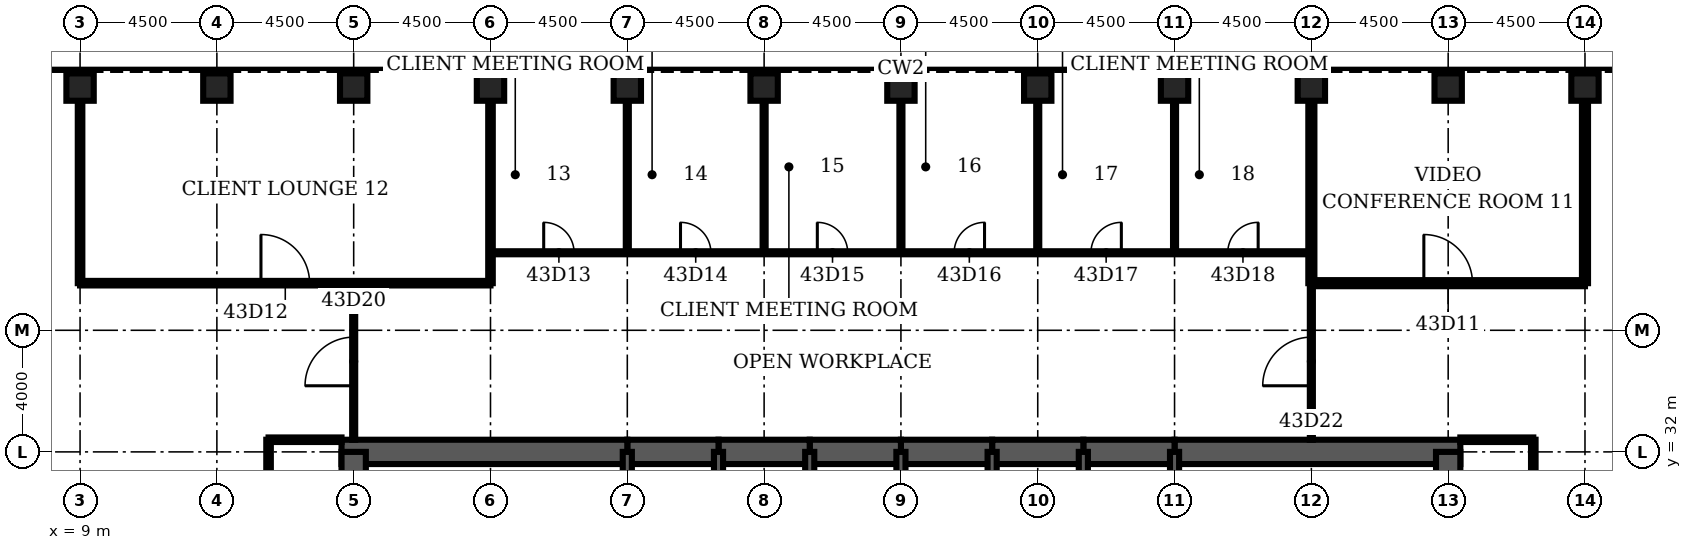
"""IFC4 building model, lengths in metres.
Left out: names, types, materials, properties, quantities, classifications, styles, units other than length and angle.
Written with IfcOpenShell. Run it as: python <this file> out.ifc"""

import sys

from ifc_helpers import new_model, si_unit, direction, frame, frame_2d, origin, origin_2d, place, context, subcontext, project, spatial, rectangle, hollow_rectangle, extrude, element, fill, save


model = new_model("IFC4")
c1 = context("Model", 3, precision=1e-05, world=origin(), true_north=direction((0.0, 1.0)))
c2 = subcontext(c1, "Body", "Model", "MODEL_VIEW")
j1 = project(units=[si_unit("LENGTHUNIT", "METRE"), si_unit("PLANEANGLEUNIT", "RADIAN")], contexts=[c1])
p1 = place(None, origin())
s1 = spatial("IfcSite", under=j1, at=p1, CompositionType="ELEMENT")
p2 = place(p1, origin())
s2 = spatial("IfcBuilding", under=s1, at=p2, CompositionType="ELEMENT")
p3 = place(p2, frame((0.0, 0.0, 194.2)))
s3 = spatial("IfcBuildingStorey", under=s2, at=p3, CompositionType="ELEMENT", Elevation=194.2)
for number, where, z_axis, x_axis in (
    (1, (58.5, 44.0, 0.0), (0.0, 0.0, 1.0), (0.0, 1.0, 0.0)),
    (2, (54.0, 44.0, 0.0), (0.0, 0.0, 1.0), (0.0, 1.0, 0.0)),
    (3, (49.5, 44.0, 0.0), (0.0, 0.0, 1.0), (0.0, 1.0, 0.0)),
    (4, (45.0, 44.0, 0.0), (0.0, 0.0, 1.0), (0.0, 1.0, 0.0)),
    (5, (40.5, 44.0, 0.0), (0.0, 0.0, 1.0), (0.0, 1.0, 0.0)),
    (6, (36.0, 44.0, 0.0), (0.0, 0.0, 1.0), (0.0, 1.0, 0.0)),
    (7, (31.5, 44.0, 0.0), (0.0, 0.0, 1.0), (0.0, 1.0, 0.0)),
    (8, (27.0, 44.0, 0.0), (0.0, 0.0, 1.0), (0.0, 1.0, 0.0)),
    (9, (22.5, 44.0, 0.0), (0.0, 0.0, 1.0), (0.0, 1.0, 0.0)),
    (10, (18.0, 44.0, 0.0), (0.0, 0.0, 1.0), (0.0, 1.0, 0.0)),
    (11, (13.5, 44.0, 0.0), (0.0, 0.0, 1.0), (0.0, 1.0, 0.0)),
    (12, (9.0, 44.0, 0.0), (0.0, 0.0, 1.0), (0.0, 1.0, 0.0)),
):
    element("IfcColumn", number, at=place(p3, frame(where, z_axis=z_axis, x_axis=x_axis)), inside=s3, PredefinedType="COLUMN", context=c2, shape_type="SweptSolid", body=[
        extrude(hollow_rectangle(XDim=0.9, YDim=0.9, WallThickness=0.09, at=origin_2d()), origin(), (0.0, 0.0, 1.0), 4.2),
    ])
p4 = place(p3, frame((54.4, 32.0, 0.0), z_axis=(0.0, 0.0, 1.0), x_axis=(-1.0, 0.0, 0.0)))
e13 = element("IfcWall", 13, at=p4, inside=s3, PredefinedType="SHEAR", context=c2, shape_type="SweptSolid", body=[
    extrude(rectangle(XDim=9.4, YDim=0.8, at=frame_2d((4.7, 0.0))), origin(), (0.0, 0.0, 1.0), 4.2),
])
for number, where, z_axis, x_axis in (
    (14, (45.0, 32.0, 0.0), (0.0, 0.0, 1.0), (-1.0, 0.0, 0.0)),
    (15, (42.0, 32.0, 0.0), (0.0, 0.0, 1.0), (-1.0, 0.0, 0.0)),
    (16, (39.0, 32.0, 0.0), (0.0, 0.0, 1.0), (-1.0, 0.0, 0.0)),
    (17, (36.0, 32.0, 0.0), (0.0, 0.0, 1.0), (-1.0, 0.0, 0.0)),
    (18, (33.0, 32.0, 0.0), (0.0, 0.0, 1.0), (-1.0, 0.0, 0.0)),
    (19, (30.0, 32.0, 0.0), (0.0, 0.0, 1.0), (-1.0, 0.0, 0.0)),
):
    element("IfcWall", number, at=place(p3, frame(where, z_axis=z_axis, x_axis=x_axis)), inside=s3, PredefinedType="SHEAR", context=c2, shape_type="SweptSolid", body=[
        extrude(rectangle(XDim=3.0, YDim=0.8, at=frame_2d((1.5, 0.0))), origin(), (0.0, 0.0, 1.0), 4.2),
    ])
p5 = place(p3, frame((27.0, 32.0, 0.0), z_axis=(0.0, 0.0, 1.0), x_axis=(-1.0, 0.0, 0.0)))
e20 = element("IfcWall", 20, at=p5, inside=s3, PredefinedType="SHEAR", context=c2, shape_type="SweptSolid", body=[
    extrude(rectangle(XDim=9.4, YDim=0.8, at=frame_2d((4.7, 0.0))), origin(), (0.0, 0.0, 1.0), 4.2),
])
for number, where, z_axis, x_axis in (
    (21, (18.0, 32.0, 0.0), (0.0, 0.0, 1.0), (0.0, -1.0, 0.0)),
    (22, (54.0, 28.8, 0.0), (0.0, 0.0, 1.0), (0.0, 1.0, 0.0)),
):
    element("IfcWall", number, at=place(p3, frame(where, z_axis=z_axis, x_axis=x_axis)), inside=s3, PredefinedType="SHEAR", context=c2, shape_type="SweptSolid", body=[
        extrude(rectangle(XDim=3.2, YDim=0.8, at=frame_2d((1.6, 0.0))), origin(), (0.0, 0.0, 1.0), 4.2),
    ])
for number, where, z_axis, x_axis in (
    (23, (27.0, 28.8, 0.0), (0.0, 0.0, 1.0), (0.0, 1.0, 0.0)),
    (24, (30.0, 28.8, 0.0), (0.0, 0.0, 1.0), (0.0, 1.0, 0.0)),
    (25, (33.0, 28.8, 0.0), (0.0, 0.0, 1.0), (0.0, 1.0, 0.0)),
    (26, (36.0, 28.8, 0.0), (0.0, 0.0, 1.0), (0.0, 1.0, 0.0)),
    (27, (39.0, 28.8, 0.0), (0.0, 0.0, 1.0), (0.0, 1.0, 0.0)),
    (28, (42.0, 28.8, 0.0), (0.0, 0.0, 1.0), (0.0, 1.0, 0.0)),
    (29, (45.0, 28.8, 0.0), (0.0, 0.0, 1.0), (0.0, 1.0, 0.0)),
):
    element("IfcWall", number, at=place(p3, frame(where, z_axis=z_axis, x_axis=x_axis)), inside=s3, PredefinedType="SOLIDWALL", context=c2, shape_type="SweptSolid", body=[
        extrude(rectangle(XDim=3.2, YDim=0.3, at=frame_2d((1.6, 0.0))), origin(), (0.0, 0.0, 1.0), 4.2),
    ])
for number, where, z_axis, x_axis in (
    (30, (15.2, 32.4, 0.0), (0.0, 0.0, 1.0), (1.0, 0.0, 0.0)),
    (31, (54.4, 32.4, 0.0), (0.0, 0.0, 1.0), (1.0, 0.0, 0.0)),
):
    element("IfcWall", number, at=place(p3, frame(where, z_axis=z_axis, x_axis=x_axis)), inside=s3, PredefinedType="PARTITIONING", context=c2, shape_type="SweptSolid", body=[
        extrude(rectangle(XDim=2.4, YDim=0.15, at=frame_2d((1.2, 0.0))), origin(), (0.0, 0.0, 1.0), 3.0),
    ])
p6 = place(p3, frame((9.0, 37.55, 0.0), z_axis=(0.0, 0.0, 1.0), x_axis=(1.0, 0.0, 0.0)))
e32 = element("IfcWall", 32, at=p6, inside=s3, PredefinedType="PARTITIONING", context=c2, shape_type="SweptSolid", body=[
    extrude(rectangle(XDim=13.5, YDim=0.15, at=frame_2d((6.75, 0.0))), origin(), (0.0, 0.0, 1.0), 3.0),
])
p7 = place(p6, frame((5.95, 0.0, 0.0)))
e33 = element("IfcOpeningElement", 33, at=p7, cuts=e32, PredefinedType="OPENING", context=c2, shape_type="SweptSolid", body=[
    extrude(rectangle(XDim=1.6, YDim=2.1, at=frame_2d((0.8, 1.05))), frame((0.0, 0.085, 0.0), z_axis=(0.0, -1.0, 0.0), x_axis=(1.0, 0.0, 0.0)), (0.0, 0.0, 1.0), 0.17),
])
p8 = place(p3, frame((49.5, 37.55, 0.0), z_axis=(0.0, 0.0, 1.0), x_axis=(1.0, 0.0, 0.0)))
e34 = element("IfcWall", 34, at=p8, inside=s3, PredefinedType="PARTITIONING", context=c2, shape_type="SweptSolid", body=[
    extrude(rectangle(XDim=9.0, YDim=0.2, at=frame_2d((4.5, 0.0))), origin(), (0.0, 0.0, 1.0), 3.0),
])
p9 = place(p8, frame((3.7, 0.0, 0.0)))
e35 = element("IfcOpeningElement", 35, at=p9, cuts=e34, PredefinedType="OPENING", context=c2, shape_type="SweptSolid", body=[
    extrude(rectangle(XDim=1.6, YDim=2.1, at=frame_2d((0.8, 1.05))), frame((0.0, 0.11, 0.0), z_axis=(0.0, -1.0, 0.0), x_axis=(1.0, 0.0, 0.0)), (0.0, 0.0, 1.0), 0.22),
])
p10 = place(p3, frame((22.5, 38.55, 0.0), z_axis=(0.0, 0.0, 1.0), x_axis=(1.0, 0.0, 0.0)))
e36 = element("IfcWall", 36, at=p10, inside=s3, PredefinedType="PARTITIONING", context=c2, shape_type="SweptSolid", body=[
    extrude(rectangle(XDim=27.0, YDim=0.1, at=frame_2d((13.5, 0.0))), origin(), (0.0, 0.0, 1.0), 3.0),
])
p11 = place(p10, frame((1.75, 0.0, 0.0)))
e37 = element("IfcOpeningElement", 37, at=p11, cuts=e36, PredefinedType="OPENING", context=c2, shape_type="SweptSolid", body=[
    extrude(rectangle(XDim=1.0, YDim=2.1, at=frame_2d((0.5, 1.05))), frame((0.0, 0.06, 0.0), z_axis=(0.0, -1.0, 0.0), x_axis=(1.0, 0.0, 0.0)), (0.0, 0.0, 1.0), 0.12),
])
p12 = place(p10, frame((6.25, 0.0, 0.0)))
e38 = element("IfcOpeningElement", 38, at=p12, cuts=e36, PredefinedType="OPENING", context=c2, shape_type="SweptSolid", body=[
    extrude(rectangle(XDim=1.0, YDim=2.1, at=frame_2d((0.5, 1.05))), frame((0.0, 0.06, 0.0), z_axis=(0.0, -1.0, 0.0), x_axis=(1.0, 0.0, 0.0)), (0.0, 0.0, 1.0), 0.12),
])
p13 = place(p10, frame((10.75, 0.0, 0.0)))
e39 = element("IfcOpeningElement", 39, at=p13, cuts=e36, PredefinedType="OPENING", context=c2, shape_type="SweptSolid", body=[
    extrude(rectangle(XDim=1.0, YDim=2.1, at=frame_2d((0.5, 1.05))), frame((0.0, 0.06, 0.0), z_axis=(0.0, -1.0, 0.0), x_axis=(1.0, 0.0, 0.0)), (0.0, 0.0, 1.0), 0.12),
])
p14 = place(p10, frame((15.25, 0.0, 0.0)))
e40 = element("IfcOpeningElement", 40, at=p14, cuts=e36, PredefinedType="OPENING", context=c2, shape_type="SweptSolid", body=[
    extrude(rectangle(XDim=1.0, YDim=2.1, at=frame_2d((0.5, 1.05))), frame((0.0, 0.06, 0.0), z_axis=(0.0, -1.0, 0.0), x_axis=(1.0, 0.0, 0.0)), (0.0, 0.0, 1.0), 0.12),
])
p15 = place(p10, frame((19.75, 0.0, 0.0)))
e41 = element("IfcOpeningElement", 41, at=p15, cuts=e36, PredefinedType="OPENING", context=c2, shape_type="SweptSolid", body=[
    extrude(rectangle(XDim=1.0, YDim=2.1, at=frame_2d((0.5, 1.05))), frame((0.0, 0.06, 0.0), z_axis=(0.0, -1.0, 0.0), x_axis=(1.0, 0.0, 0.0)), (0.0, 0.0, 1.0), 0.12),
])
p16 = place(p10, frame((24.25, 0.0, 0.0)))
e42 = element("IfcOpeningElement", 42, at=p16, cuts=e36, PredefinedType="OPENING", context=c2, shape_type="SweptSolid", body=[
    extrude(rectangle(XDim=1.0, YDim=2.1, at=frame_2d((0.5, 1.05))), frame((0.0, 0.06, 0.0), z_axis=(0.0, -1.0, 0.0), x_axis=(1.0, 0.0, 0.0)), (0.0, 0.0, 1.0), 0.12),
])
p17 = place(p3, frame((9.0, 37.55, 0.0), z_axis=(0.0, 0.0, 1.0), x_axis=(0.0, 1.0, 0.0)))
e43 = element("IfcWall", 43, at=p17, inside=s3, PredefinedType="PARTITIONING", context=c2, shape_type="SweptSolid", body=[
    extrude(rectangle(XDim=6.0, YDim=0.15, at=frame_2d((3.0, 0.0))), origin(), (0.0, 0.0, 1.0), 3.0),
])
p18 = place(p3, frame((15.2, 13.8, 0.0), z_axis=(0.0, 0.0, 1.0), x_axis=(0.0, 1.0, 0.0)))
e44 = element("IfcWall", 44, at=p18, inside=s3, PredefinedType="PARTITIONING", context=c2, shape_type="SweptSolid", body=[
    extrude(rectangle(XDim=18.6, YDim=0.15, at=frame_2d((9.3, 0.0))), origin(), (0.0, 0.0, 1.0), 3.0),
])
p19 = place(p18, frame((8.7, 0.0, 0.0)))
e45 = element("IfcOpeningElement", 45, at=p19, cuts=e44, PredefinedType="OPENING", context=c2, shape_type="SweptSolid", body=[
    extrude(rectangle(XDim=1.2, YDim=2.1, at=frame_2d((0.6, 1.05))), frame((0.0, 0.085, 0.0), z_axis=(0.0, -1.0, 0.0), x_axis=(1.0, 0.0, 0.0)), (0.0, 0.0, 1.0), 0.17),
])
p20 = place(p3, frame((18.0, 32.4, 0.0), z_axis=(0.0, 0.0, 1.0), x_axis=(0.0, 1.0, 0.0)))
e46 = element("IfcWall", 46, at=p20, inside=s3, PredefinedType="PARTITIONING", context=c2, shape_type="SweptSolid", body=[
    extrude(rectangle(XDim=5.15, YDim=0.1, at=frame_2d((2.575, 0.0))), origin(), (0.0, 0.0, 1.0), 3.0),
])
p21 = place(p20, frame((1.775, 0.0, 0.0)))
e47 = element("IfcOpeningElement", 47, at=p21, cuts=e46, PredefinedType="OPENING", context=c2, shape_type="SweptSolid", body=[
    extrude(rectangle(XDim=1.6, YDim=2.1, at=frame_2d((0.8, 1.05))), frame((0.0, 0.06, 0.0), z_axis=(0.0, -1.0, 0.0), x_axis=(1.0, 0.0, 0.0)), (0.0, 0.0, 1.0), 0.12),
])
p22 = place(p3, frame((22.5, 37.55, 0.0), z_axis=(0.0, 0.0, 1.0), x_axis=(0.0, 1.0, 0.0)))
e48 = element("IfcWall", 48, at=p22, inside=s3, PredefinedType="PARTITIONING", context=c2, shape_type="SweptSolid", body=[
    extrude(rectangle(XDim=6.0, YDim=0.15, at=frame_2d((3.0, 0.0))), origin(), (0.0, 0.0, 1.0), 3.0),
])
for number, where, z_axis, x_axis in (
    (49, (27.0, 38.55, 0.0), (0.0, 0.0, 1.0), (0.0, 1.0, 0.0)),
    (50, (31.5, 38.55, 0.0), (0.0, 0.0, 1.0), (0.0, 1.0, 0.0)),
    (51, (36.0, 38.55, 0.0), (0.0, 0.0, 1.0), (0.0, 1.0, 0.0)),
    (52, (40.5, 38.55, 0.0), (0.0, 0.0, 1.0), (0.0, 1.0, 0.0)),
    (53, (45.0, 38.55, 0.0), (0.0, 0.0, 1.0), (0.0, 1.0, 0.0)),
):
    element("IfcWall", number, at=place(p3, frame(where, z_axis=z_axis, x_axis=x_axis)), inside=s3, PredefinedType="PARTITIONING", context=c2, shape_type="SweptSolid", body=[
        extrude(rectangle(XDim=5.0, YDim=0.1, at=frame_2d((2.5, 0.0))), origin(), (0.0, 0.0, 1.0), 3.0),
    ])
p23 = place(p3, frame((49.5, 32.4, 0.0), z_axis=(0.0, 0.0, 1.0), x_axis=(0.0, 1.0, 0.0)))
e54 = element("IfcWall", 54, at=p23, inside=s3, PredefinedType="PARTITIONING", context=c2, shape_type="SweptSolid", body=[
    extrude(rectangle(XDim=5.15, YDim=0.1, at=frame_2d((2.575, 0.0))), origin(), (0.0, 0.0, 1.0), 3.0),
])
p24 = place(p23, frame((1.775, 0.0, 0.0)))
e55 = element("IfcOpeningElement", 55, at=p24, cuts=e54, PredefinedType="OPENING", context=c2, shape_type="SweptSolid", body=[
    extrude(rectangle(XDim=1.6, YDim=2.1, at=frame_2d((0.8, 1.05))), frame((0.0, 0.06, 0.0), z_axis=(0.0, -1.0, 0.0), x_axis=(1.0, 0.0, 0.0)), (0.0, 0.0, 1.0), 0.12),
])
p25 = place(p3, frame((49.5, 37.55, 0.0), z_axis=(0.0, 0.0, 1.0), x_axis=(0.0, 1.0, 0.0)))
e56 = element("IfcWall", 56, at=p25, inside=s3, PredefinedType="PARTITIONING", context=c2, shape_type="SweptSolid", body=[
    extrude(rectangle(XDim=6.0, YDim=0.2, at=frame_2d((3.0, 0.0))), origin(), (0.0, 0.0, 1.0), 3.0),
])
p26 = place(p3, frame((56.8, 13.8, 0.0), z_axis=(0.0, 0.0, 1.0), x_axis=(0.0, 1.0, 0.0)))
e57 = element("IfcWall", 57, at=p26, inside=s3, PredefinedType="PARTITIONING", context=c2, shape_type="SweptSolid", body=[
    extrude(rectangle(XDim=18.6, YDim=0.15, at=frame_2d((9.3, 0.0))), origin(), (0.0, 0.0, 1.0), 3.0),
])
p27 = place(p26, frame((8.7, 0.0, 0.0)))
e58 = element("IfcOpeningElement", 58, at=p27, cuts=e57, PredefinedType="OPENING", context=c2, shape_type="SweptSolid", body=[
    extrude(rectangle(XDim=1.2, YDim=2.1, at=frame_2d((0.6, 1.05))), frame((0.0, 0.085, 0.0), z_axis=(0.0, -1.0, 0.0), x_axis=(1.0, 0.0, 0.0)), (0.0, 0.0, 1.0), 0.17),
])
p28 = place(p3, frame((58.5, 37.55, 0.0), z_axis=(0.0, 0.0, 1.0), x_axis=(0.0, 1.0, 0.0)))
e59 = element("IfcWall", 59, at=p28, inside=s3, PredefinedType="PARTITIONING", context=c2, shape_type="SweptSolid", body=[
    extrude(rectangle(XDim=6.0, YDim=0.2, at=frame_2d((3.0, 0.0))), origin(), (0.0, 0.0, 1.0), 3.0),
])
p29 = place(p9, origin())
e60 = element("IfcDoor", 60, at=p29, inside=s3, OperationType="SINGLE_SWING_LEFT", PredefinedType="DOOR", context=c2, shape_type="SweptSolid", body=[
    extrude(rectangle(XDim=1.6, YDim=2.1, at=frame_2d((0.8, 1.05))), frame((0.0, 0.025, 0.0), z_axis=(0.0, -1.0, 0.0), x_axis=(1.0, 0.0, 0.0)), (0.0, 0.0, 1.0), 0.05),
])
fill(e35, e60)
p30 = place(p7, origin())
e61 = element("IfcDoor", 61, at=p30, inside=s3, OperationType="SINGLE_SWING_LEFT", PredefinedType="DOOR", context=c2, shape_type="SweptSolid", body=[
    extrude(rectangle(XDim=1.6, YDim=2.1, at=frame_2d((0.8, 1.05))), frame((0.0, 0.025, 0.0), z_axis=(0.0, -1.0, 0.0), x_axis=(1.0, 0.0, 0.0)), (0.0, 0.0, 1.0), 0.05),
])
fill(e33, e61)
p31 = place(p11, origin())
e62 = element("IfcDoor", 62, at=p31, inside=s3, OperationType="SINGLE_SWING_LEFT", PredefinedType="DOOR", context=c2, shape_type="SweptSolid", body=[
    extrude(rectangle(XDim=1.0, YDim=2.1, at=frame_2d((0.5, 1.05))), frame((0.0, 0.025, 0.0), z_axis=(0.0, -1.0, 0.0), x_axis=(1.0, 0.0, 0.0)), (0.0, 0.0, 1.0), 0.05),
])
fill(e37, e62)
p32 = place(p12, origin())
e63 = element("IfcDoor", 63, at=p32, inside=s3, OperationType="SINGLE_SWING_LEFT", PredefinedType="DOOR", context=c2, shape_type="SweptSolid", body=[
    extrude(rectangle(XDim=1.0, YDim=2.1, at=frame_2d((0.5, 1.05))), frame((0.0, 0.025, 0.0), z_axis=(0.0, -1.0, 0.0), x_axis=(1.0, 0.0, 0.0)), (0.0, 0.0, 1.0), 0.05),
])
fill(e38, e63)
p33 = place(p13, origin())
e64 = element("IfcDoor", 64, at=p33, inside=s3, OperationType="SINGLE_SWING_LEFT", PredefinedType="DOOR", context=c2, shape_type="SweptSolid", body=[
    extrude(rectangle(XDim=1.0, YDim=2.1, at=frame_2d((0.5, 1.05))), frame((0.0, 0.025, 0.0), z_axis=(0.0, -1.0, 0.0), x_axis=(1.0, 0.0, 0.0)), (0.0, 0.0, 1.0), 0.05),
])
fill(e39, e64)
p34 = place(p14, origin())
e65 = element("IfcDoor", 65, at=p34, inside=s3, OperationType="SINGLE_SWING_RIGHT", PredefinedType="DOOR", context=c2, shape_type="SweptSolid", body=[
    extrude(rectangle(XDim=1.0, YDim=2.1, at=frame_2d((0.5, 1.05))), frame((0.0, 0.025, 0.0), z_axis=(0.0, -1.0, 0.0), x_axis=(1.0, 0.0, 0.0)), (0.0, 0.0, 1.0), 0.05),
])
fill(e40, e65)
p35 = place(p15, origin())
e66 = element("IfcDoor", 66, at=p35, inside=s3, OperationType="SINGLE_SWING_RIGHT", PredefinedType="DOOR", context=c2, shape_type="SweptSolid", body=[
    extrude(rectangle(XDim=1.0, YDim=2.1, at=frame_2d((0.5, 1.05))), frame((0.0, 0.025, 0.0), z_axis=(0.0, -1.0, 0.0), x_axis=(1.0, 0.0, 0.0)), (0.0, 0.0, 1.0), 0.05),
])
fill(e41, e66)
p36 = place(p16, origin())
e67 = element("IfcDoor", 67, at=p36, inside=s3, OperationType="SINGLE_SWING_RIGHT", PredefinedType="DOOR", context=c2, shape_type="SweptSolid", body=[
    extrude(rectangle(XDim=1.0, YDim=2.1, at=frame_2d((0.5, 1.05))), frame((0.0, 0.025, 0.0), z_axis=(0.0, -1.0, 0.0), x_axis=(1.0, 0.0, 0.0)), (0.0, 0.0, 1.0), 0.05),
])
fill(e42, e67)
p37 = place(p21, origin())
e68 = element("IfcDoor", 68, at=p37, inside=s3, OperationType="SINGLE_SWING_LEFT", PredefinedType="DOOR", context=c2, shape_type="SweptSolid", body=[
    extrude(rectangle(XDim=1.6, YDim=2.1, at=frame_2d((0.8, 1.05))), frame((0.0, 0.025, 0.0), z_axis=(0.0, -1.0, 0.0), x_axis=(1.0, 0.0, 0.0)), (0.0, 0.0, 1.0), 0.05),
])
fill(e47, e68)
p38 = place(p24, origin())
e69 = element("IfcDoor", 69, at=p38, inside=s3, OperationType="SINGLE_SWING_LEFT", PredefinedType="DOOR", context=c2, shape_type="SweptSolid", body=[
    extrude(rectangle(XDim=1.6, YDim=2.1, at=frame_2d((0.8, 1.05))), frame((0.0, 0.025, 0.0), z_axis=(0.0, -1.0, 0.0), x_axis=(1.0, 0.0, 0.0)), (0.0, 0.0, 1.0), 0.05),
])
fill(e55, e69)
save(model, sys.argv[1])
